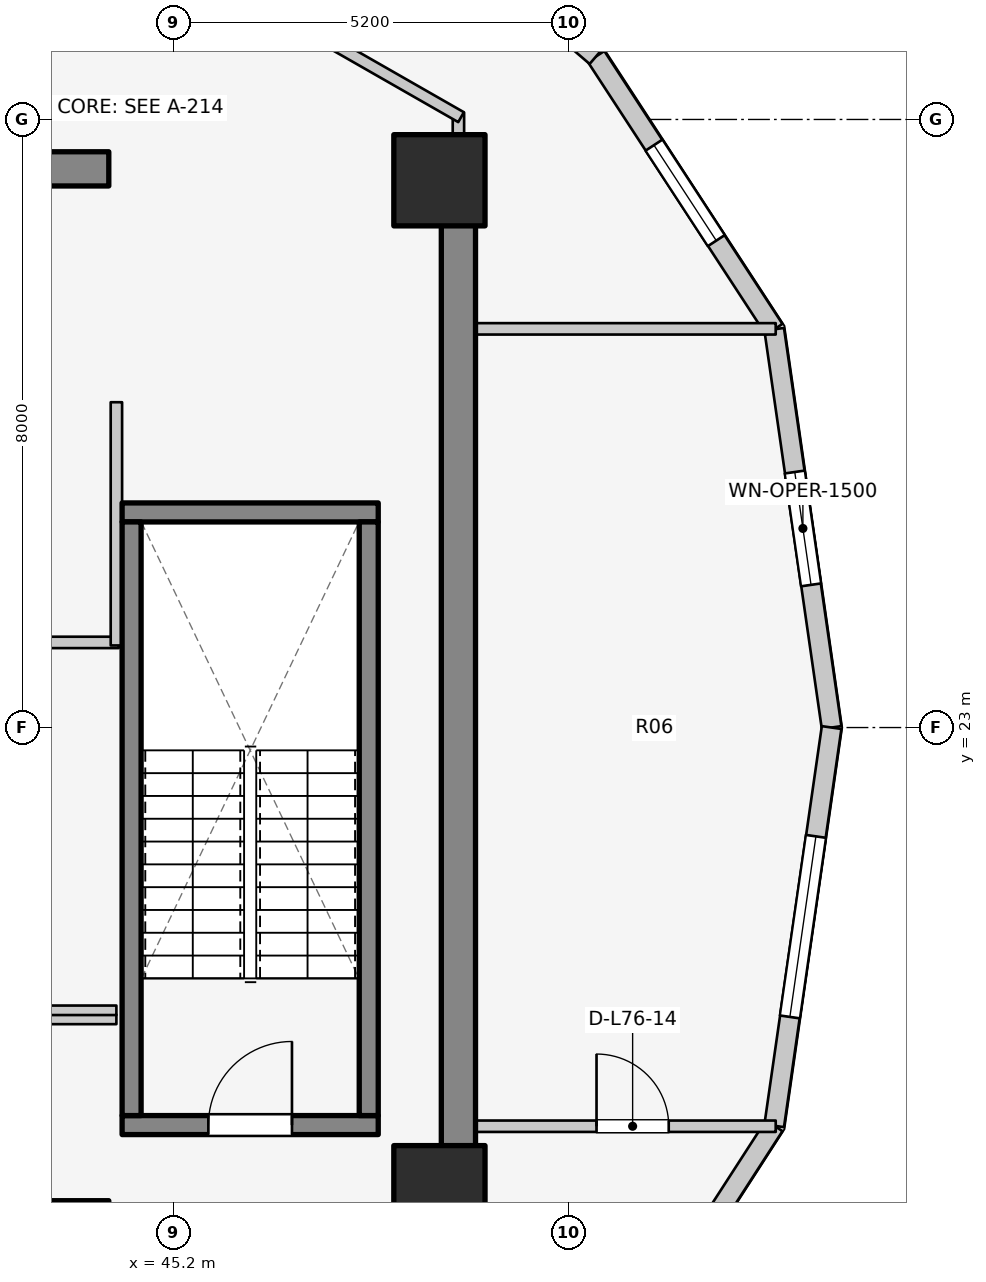
"""IFC4 building model, lengths in metres.
Left out: names, types, materials, properties, quantities, classifications, styles, units other than length and angle.
Written with IfcOpenShell. Run it as: python <this file> out.ifc"""

import sys

from ifc_helpers import new_model, si_unit, direction, frame, frame_2d, origin, origin_2d, place, context, subcontext, project, spatial, rectangle, extrude, element, fill, save


model = new_model("IFC4")
c1 = context("Model", 3, precision=1e-05, world=origin(), true_north=direction((0.0, 1.0)))
c2 = subcontext(c1, "Body", "Model", "MODEL_VIEW")
j1 = project(units=[si_unit("LENGTHUNIT", "METRE"), si_unit("PLANEANGLEUNIT", "RADIAN")], contexts=[c1])
p1 = place(None, origin())
s1 = spatial("IfcSite", under=j1, at=p1, CompositionType="ELEMENT")
p2 = place(p1, origin())
s2 = spatial("IfcBuilding", under=s1, at=p2, CompositionType="ELEMENT")
p3 = place(p2, frame((0.0, 0.0, 249.6)))
s3 = spatial("IfcBuildingStorey", under=s2, at=p3, CompositionType="ELEMENT", Elevation=249.6)
p4 = place(p3, frame((48.95, 17.05, 0.0), z_axis=(0.0, 0.0, 1.0), x_axis=(0.0, 1.0, 0.0)))
e1 = element("IfcWall", 1, at=p4, inside=s3, PredefinedType="SHEAR", context=c2, shape_type="SweptSolid", body=[
    extrude(rectangle(XDim=12.8, YDim=0.45, at=frame_2d((6.4, 0.0))), origin(), (0.0, 0.0, 1.0), 3.6),
])
for number, where, z_axis, x_axis in (
    (2, (39.85, 16.55, 0.0), (0.0, 0.0, 1.0), (1.0, 0.0, 0.0)),
    (3, (39.85, 30.35, 0.0), (0.0, 0.0, 1.0), (1.0, 0.0, 0.0)),
):
    element("IfcWall", number, at=place(p3, frame(where, z_axis=z_axis, x_axis=x_axis)), inside=s3, PredefinedType="SHEAR", context=c2, shape_type="SweptSolid", body=[
        extrude(rectangle(XDim=4.5, YDim=0.45, at=frame_2d((2.25, 0.0))), origin(), (0.0, 0.0, 1.0), 3.6),
    ])
p5 = place(p3, frame((44.525, 17.77, 0.0), z_axis=(0.0, 0.0, 1.0), x_axis=(1.0, 0.0, 0.0)))
e4 = element("IfcWall", 4, at=p5, inside=s3, PredefinedType="SOLIDWALL", context=c2, shape_type="SweptSolid", body=[
    extrude(rectangle(XDim=3.37, YDim=0.25, at=frame_2d((1.685, 0.0))), origin(), (0.0, 0.0, 1.0), 3.6),
])
p6 = place(p5, frame((1.135, 0.0, 0.0)))
e5 = element("IfcOpeningElement", 5, at=p6, cuts=e4, PredefinedType="OPENING", context=c2, shape_type="SweptSolid", body=[
    extrude(rectangle(XDim=1.1, YDim=2.1, at=frame_2d((0.55, 1.05))), frame((0.0, 0.135, 0.0), z_axis=(0.0, -1.0, 0.0), x_axis=(1.0, 0.0, 0.0)), (0.0, 0.0, 1.0), 0.27),
])
p7 = place(p3, frame((44.525, 25.83, 0.0), z_axis=(0.0, 0.0, 1.0), x_axis=(1.0, 0.0, 0.0)))
e6 = element("IfcWall", 6, at=p7, inside=s3, PredefinedType="SOLIDWALL", context=c2, shape_type="SweptSolid", body=[
    extrude(rectangle(XDim=3.37, YDim=0.25, at=frame_2d((1.685, 0.0))), origin(), (0.0, 0.0, 1.0), 3.6),
])
for number, where, z_axis, x_axis in (
    (7, (44.65, 17.895, 0.0), (0.0, 0.0, 1.0), (0.0, 1.0, 0.0)),
    (8, (47.77, 17.895, 0.0), (0.0, 0.0, 1.0), (0.0, 1.0, 0.0)),
):
    element("IfcWall", number, at=place(p3, frame(where, z_axis=z_axis, x_axis=x_axis)), inside=s3, PredefinedType="SOLIDWALL", context=c2, shape_type="SweptSolid", body=[
        extrude(rectangle(XDim=7.81, YDim=0.25, at=frame_2d((3.905, 0.0))), origin(), (0.0, 0.0, 1.0), 3.6),
    ])
for number, where, z_axis, x_axis in (
    (9, (48.7, 16.9, 0.0), (0.0, 0.0, 1.0), (1.0, 0.0, 0.0)),
    (10, (48.7, 30.2, 0.0), (0.0, 0.0, 1.0), (1.0, 0.0, 0.0)),
):
    element("IfcColumn", number, at=place(p3, frame(where, z_axis=z_axis, x_axis=x_axis)), inside=s3, PredefinedType="COLUMN", context=c2, shape_type="SweptSolid", body=[
        extrude(rectangle(XDim=1.2, YDim=1.2, at=origin_2d()), origin(), (0.0, 0.0, 1.0), 3.6),
    ])
p8 = place(p3, frame((53.86, 23.0, 0.0), z_axis=(0.0, 0.0, 1.0), x_axis=(-0.142712754019, 0.989764148593, 0.0)))
e11 = element("IfcWall", 11, at=p8, inside=s3, PredefinedType="STANDARD", context=c2, shape_type="SweptSolid", body=[
    extrude(rectangle(XDim=5.293, YDim=0.26, at=frame_2d((2.646, 0.0))), origin(), (0.0, 0.0, 1.0), 3.29),
])
p9 = place(p8, frame((1.896, 0.0, 0.75)))
e12 = element("IfcOpeningElement", 12, at=p9, cuts=e11, PredefinedType="OPENING", context=c2, shape_type="SweptSolid", body=[
    extrude(rectangle(XDim=1.5, YDim=1.6, at=frame_2d((0.75, 0.8))), frame((0.0, 0.14, 0.0), z_axis=(0.0, -1.0, 0.0), x_axis=(1.0, 0.0, 0.0)), (0.0, 0.0, 1.0), 0.28),
])
p10 = place(p3, frame((53.105, 28.239, 0.0), z_axis=(0.0, 0.0, 1.0), x_axis=(-0.546606419826, 0.837389647539, 0.0)))
e13 = element("IfcWall", 13, at=p10, inside=s3, PredefinedType="STANDARD", context=c2, shape_type="SweptSolid", body=[
    extrude(rectangle(XDim=4.288, YDim=0.26, at=frame_2d((2.144, 0.0))), origin(), (0.0, 0.0, 1.0), 3.29),
])
p11 = place(p10, frame((1.394, 0.0, 0.75)))
e14 = element("IfcOpeningElement", 14, at=p11, cuts=e13, PredefinedType="OPENING", context=c2, shape_type="SweptSolid", body=[
    extrude(rectangle(XDim=1.5, YDim=1.6, at=frame_2d((0.75, 0.8))), frame((0.0, 0.14, 0.0), z_axis=(0.0, -1.0, 0.0), x_axis=(1.0, 0.0, 0.0)), (0.0, 0.0, 1.0), 0.28),
])
p12 = place(p3, frame((50.761, 31.829, 0.0), z_axis=(0.0, 0.0, 1.0), x_axis=(-0.759587504333, 0.650405122413, 0.0)))
e15 = element("IfcWall", 15, at=p12, inside=s3, PredefinedType="STANDARD", context=c2, shape_type="SweptSolid", body=[
    extrude(rectangle(XDim=4.217, YDim=0.26, at=frame_2d((2.109, 0.0))), origin(), (0.0, 0.0, 1.0), 3.29),
])
p13 = place(p12, frame((1.359, 0.0, 0.75)))
e16 = element("IfcOpeningElement", 16, at=p13, cuts=e15, PredefinedType="OPENING", context=c2, shape_type="SweptSolid", body=[
    extrude(rectangle(XDim=1.5, YDim=1.6, at=frame_2d((0.75, 0.8))), frame((0.0, 0.14, 0.0), z_axis=(0.0, -1.0, 0.0), x_axis=(1.0, 0.0, 0.0)), (0.0, 0.0, 1.0), 0.28),
])
p14 = place(p3, frame((50.761, 14.133, 0.0), z_axis=(0.0, 0.0, 1.0), x_axis=(0.542641766008, 0.839964233634, 0.0)))
e17 = element("IfcWall", 17, at=p14, inside=s3, PredefinedType="STANDARD", context=c2, shape_type="SweptSolid", body=[
    extrude(rectangle(XDim=4.319, YDim=0.26, at=frame_2d((2.16, 0.0))), origin(), (0.0, 0.0, 1.0), 3.29),
])
p15 = place(p14, frame((1.41, 0.0, 0.75)))
e18 = element("IfcOpeningElement", 18, at=p15, cuts=e17, PredefinedType="OPENING", context=c2, shape_type="SweptSolid", body=[
    extrude(rectangle(XDim=1.5, YDim=1.6, at=frame_2d((0.75, 0.8))), frame((0.0, 0.14, 0.0), z_axis=(0.0, -1.0, 0.0), x_axis=(1.0, 0.0, 0.0)), (0.0, 0.0, 1.0), 0.28),
])
p16 = place(p3, frame((53.105, 17.761, 0.0), z_axis=(0.0, 0.0, 1.0), x_axis=(0.142712754019, 0.989764148593, 0.0)))
e19 = element("IfcWall", 19, at=p16, inside=s3, PredefinedType="STANDARD", context=c2, shape_type="SweptSolid", body=[
    extrude(rectangle(XDim=5.293, YDim=0.26, at=frame_2d((2.646, 0.0))), origin(), (0.0, 0.0, 1.0), 3.29),
])
p17 = place(p16, frame((1.447, 0.0, 0.75)))
e20 = element("IfcOpeningElement", 20, at=p17, cuts=e19, PredefinedType="OPENING", context=c2, shape_type="SweptSolid", body=[
    extrude(rectangle(XDim=2.4, YDim=1.7, at=frame_2d((1.2, 0.85))), frame((0.0, 0.14, 0.0), z_axis=(0.0, -1.0, 0.0), x_axis=(1.0, 0.0, 0.0)), (0.0, 0.0, 1.0), 0.28),
])
p18 = place(p3, frame((39.4, 24.12, 0.0), z_axis=(0.0, 0.0, 1.0), x_axis=(1.0, 0.0, 0.0)))
e21 = element("IfcWall", 21, at=p18, inside=s3, PredefinedType="PARTITIONING", context=c2, shape_type="SweptSolid", body=[
    extrude(rectangle(XDim=5.08, YDim=0.15, at=frame_2d((2.54, 0.0))), origin(), (0.0, 0.0, 1.0), 2.62),
])
p19 = place(p3, frame((44.45, 24.08, 0.0), z_axis=(0.0, 0.0, 1.0), x_axis=(0.0, 1.0, 0.0)))
e22 = element("IfcWall", 22, at=p19, inside=s3, PredefinedType="PARTITIONING", context=c2, shape_type="SweptSolid", body=[
    extrude(rectangle(XDim=3.2, YDim=0.15, at=frame_2d((1.6, 0.0))), origin(), (0.0, 0.0, 1.0), 3.295),
])
p20 = place(p3, frame((39.58, 19.16, 0.0), z_axis=(0.0, 0.0, 1.0), x_axis=(1.0, 0.0, 0.0)))
e23 = element("IfcWall", 23, at=p20, inside=s3, PredefinedType="PARTITIONING", context=c2, shape_type="SweptSolid", body=[
    extrude(rectangle(XDim=4.87, YDim=0.125, at=frame_2d((2.435, 0.0))), origin(), (0.0, 0.0, 1.0), 2.62),
])
p21 = place(p20, frame((1.748, 0.0, 0.0)))
e24 = element("IfcOpeningElement", 24, at=p21, cuts=e23, PredefinedType="OPENING", context=c2, shape_type="SweptSolid", body=[
    extrude(rectangle(XDim=0.85, YDim=2.05, at=frame_2d((0.425, 1.025))), frame((0.0, 0.073, 0.0), z_axis=(0.0, -1.0, 0.0), x_axis=(1.0, 0.0, 0.0)), (0.0, 0.0, 1.0), 0.145),
])
p22 = place(p3, frame((42.24, 19.28, 0.0), z_axis=(0.0, 0.0, 1.0), x_axis=(1.0, 0.0, 0.0)))
e25 = element("IfcWall", 25, at=p22, inside=s3, PredefinedType="PARTITIONING", context=c2, shape_type="SweptSolid", body=[
    extrude(rectangle(XDim=2.21, YDim=0.125, at=frame_2d((1.105, 0.0))), origin(), (0.0, 0.0, 1.0), 2.62),
])
p23 = place(p3, frame((48.95, 17.755, 0.0), z_axis=(0.0, 0.0, 1.0), x_axis=(1.0, 0.0, 0.0)))
e26 = element("IfcWall", 26, at=p23, inside=s3, PredefinedType="PARTITIONING", context=c2, shape_type="SweptSolid", body=[
    extrude(rectangle(XDim=4.175, YDim=0.15, at=frame_2d((2.087, 0.0))), origin(), (0.0, 0.0, 1.0), 3.295),
])
p24 = place(p23, frame((1.817, 0.0, 0.0)))
e27 = element("IfcOpeningElement", 27, at=p24, cuts=e26, PredefinedType="OPENING", context=c2, shape_type="SweptSolid", body=[
    extrude(rectangle(XDim=0.95, YDim=2.1, at=frame_2d((0.475, 1.05))), frame((0.0, 0.085, 0.0), z_axis=(0.0, -1.0, 0.0), x_axis=(1.0, 0.0, 0.0)), (0.0, 0.0, 1.0), 0.17),
])
p25 = place(p3, frame((48.95, 28.245, 0.0), z_axis=(0.0, 0.0, 1.0), x_axis=(1.0, 0.0, 0.0)))
e28 = element("IfcWall", 28, at=p25, inside=s3, PredefinedType="PARTITIONING", context=c2, shape_type="SweptSolid", body=[
    extrude(rectangle(XDim=4.175, YDim=0.15, at=frame_2d((2.087, 0.0))), origin(), (0.0, 0.0, 1.0), 3.295),
])
p26 = place(p3, frame((48.95, 29.8, 0.0), z_axis=(0.0, 0.0, 1.0), x_axis=(0.0, 1.0, 0.0)))
e29 = element("IfcWall", 29, at=p26, inside=s3, PredefinedType="PARTITIONING", context=c2, shape_type="SweptSolid", body=[
    extrude(rectangle(XDim=1.29, YDim=0.15, at=frame_2d((0.645, 0.0))), origin(), (0.0, 0.0, 1.0), 3.295),
])
p27 = place(p3, frame((46.757, 32.305, 0.0), z_axis=(0.0, 0.0, 1.0), x_axis=(0.867991349648, -0.496579315857, 0.0)))
e30 = element("IfcWall", 30, at=p27, inside=s3, PredefinedType="PARTITIONING", context=c2, shape_type="SweptSolid", body=[
    extrude(rectangle(XDim=2.567, YDim=0.15, at=frame_2d((1.283, 0.0))), origin(), (0.0, 0.0, 1.0), 2.66),
])
p28 = place(p9, origin())
e31 = element("IfcWindow", 31, at=p28, inside=s3, PartitioningType="SINGLE_PANEL", PredefinedType="WINDOW", context=c2, shape_type="SweptSolid", body=[
    extrude(rectangle(XDim=1.5, YDim=1.6, at=frame_2d((0.75, 0.8))), frame((0.0, 0.03, 0.0), z_axis=(0.0, -1.0, 0.0), x_axis=(1.0, 0.0, 0.0)), (0.0, 0.0, 1.0), 0.06),
])
fill(e12, e31)
p29 = place(p11, origin())
e32 = element("IfcWindow", 32, at=p29, inside=s3, PartitioningType="SINGLE_PANEL", PredefinedType="WINDOW", context=c2, shape_type="SweptSolid", body=[
    extrude(rectangle(XDim=1.5, YDim=1.6, at=frame_2d((0.75, 0.8))), frame((0.0, 0.03, 0.0), z_axis=(0.0, -1.0, 0.0), x_axis=(1.0, 0.0, 0.0)), (0.0, 0.0, 1.0), 0.06),
])
fill(e14, e32)
p30 = place(p17, origin())
e33 = element("IfcWindow", 33, at=p30, inside=s3, PartitioningType="SINGLE_PANEL", PredefinedType="WINDOW", context=c2, shape_type="SweptSolid", body=[
    extrude(rectangle(XDim=2.4, YDim=1.7, at=frame_2d((1.2, 0.85))), frame((0.0, 0.03, 0.0), z_axis=(0.0, -1.0, 0.0), x_axis=(1.0, 0.0, 0.0)), (0.0, 0.0, 1.0), 0.06),
])
fill(e20, e33)
p31 = place(p6, origin())
e34 = element("IfcDoor", 34, at=p31, inside=s3, OperationType="SINGLE_SWING_RIGHT", PredefinedType="DOOR", context=c2, shape_type="SweptSolid", body=[
    extrude(rectangle(XDim=1.1, YDim=2.1, at=frame_2d((0.55, 1.05))), frame((0.0, 0.025, 0.0), z_axis=(0.0, -1.0, 0.0), x_axis=(1.0, 0.0, 0.0)), (0.0, 0.0, 1.0), 0.05),
])
fill(e5, e34)
p32 = place(p24, origin())
e35 = element("IfcDoor", 35, at=p32, inside=s3, OperationType="SINGLE_SWING_LEFT", PredefinedType="DOOR", context=c2, shape_type="SweptSolid", body=[
    extrude(rectangle(XDim=0.95, YDim=2.1, at=frame_2d((0.475, 1.05))), frame((0.0, 0.025, 0.0), z_axis=(0.0, -1.0, 0.0), x_axis=(1.0, 0.0, 0.0)), (0.0, 0.0, 1.0), 0.05),
])
fill(e27, e35)
save(model, sys.argv[1])
